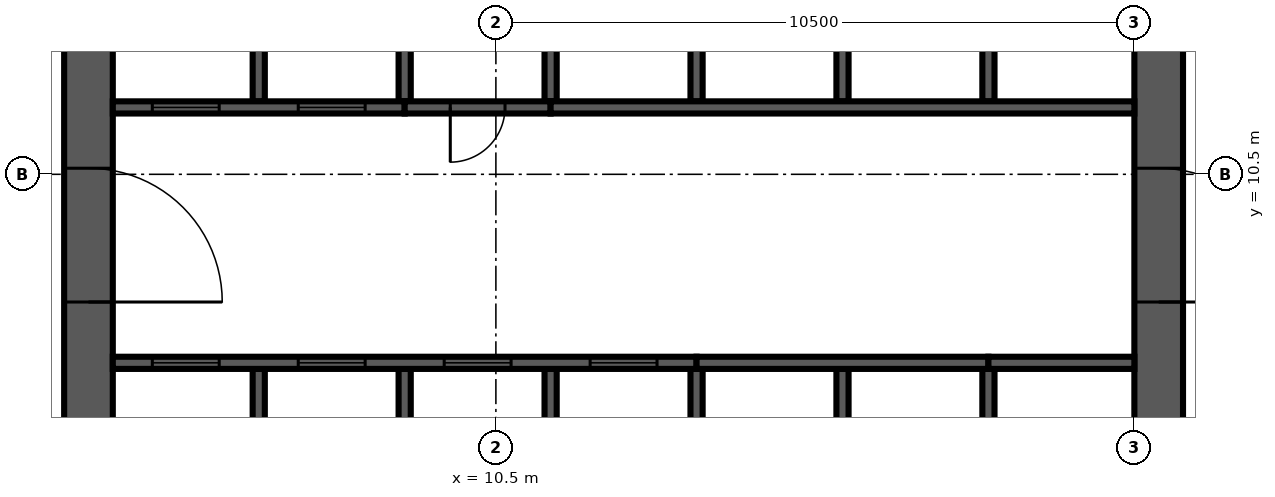
"""IFC4 building model, lengths in metres.
Left out: names, types, materials, properties, quantities, classifications, styles, units other than length and angle.
Written with IfcOpenShell. Run it as: python <this file> out.ifc"""

import sys

from ifc_helpers import new_model, si_unit, direction, frame, frame_2d, origin, place, context, subcontext, project, spatial, rectangle, extrude, source, transform, mapped, element, fill, save


model = new_model("IFC4")
c1 = context("Model", 3, precision=1e-05, world=origin(), true_north=direction((0.0, 1.0)))
c2 = subcontext(c1, "Body", "Model", "MODEL_VIEW")
j1 = project(units=[si_unit("LENGTHUNIT", "METRE"), si_unit("PLANEANGLEUNIT", "RADIAN")], contexts=[c1])
p1 = place(None, origin())
s1 = spatial("IfcSite", under=j1, at=p1, CompositionType="ELEMENT")
p2 = place(p1, origin())
s2 = spatial("IfcBuilding", under=s1, at=p2, CompositionType="ELEMENT")
p3 = place(p2, frame((0.0, 0.0, 177.8)))
s3 = spatial("IfcBuildingStorey", under=s2, at=p3, CompositionType="ELEMENT", Elevation=177.8)
p4 = place(p3, frame((3.8, 4.2, 0.0), z_axis=(0.0, 0.0, 1.0), x_axis=(0.0, 1.0, 0.0)))
e1 = element("IfcWall", 1, at=p4, inside=s3, PredefinedType="SHEAR", context=c2, shape_type="SweptSolid", body=[
    extrude(rectangle(XDim=17.6, YDim=0.8, at=frame_2d((8.8, 0.0))), origin(), (0.0, 0.0, 1.0), 3.8),
])
m1 = source(origin(), c2, "Body", "SweptSolid", [
    extrude(rectangle(XDim=2.2, YDim=2.1, at=frame_2d((1.1, 1.05))), frame((0.0, 0.41, 0.0), z_axis=(0.0, -1.0, 0.0), x_axis=(1.0, 0.0, 0.0)), (0.0, 0.0, 1.0), 0.82),
])
p5 = place(p4, frame((4.2, 0.0, 0.0)))
e2 = element("IfcOpeningElement", 2, at=p5, cuts=e1, PredefinedType="OPENING", context=c2, shape_type="MappedRepresentation", body=[
    mapped(m1, transform((0.0, 0.0, 0.0), scale=1.0)),
])
p6 = place(p4, frame((10.95, 0.0, 0.0)))
e3 = element("IfcOpeningElement", 3, at=p6, cuts=e1, PredefinedType="OPENING", context=c2, shape_type="SweptSolid", body=[
    extrude(rectangle(XDim=0.9, YDim=2.1, at=frame_2d((0.45, 1.05))), frame((0.0, 0.41, 0.0), z_axis=(0.0, -1.0, 0.0), x_axis=(1.0, 0.0, 0.0)), (0.0, 0.0, 1.0), 0.82),
])
p7 = place(p3, frame((21.4, 4.2, 0.0), z_axis=(0.0, 0.0, 1.0), x_axis=(0.0, 1.0, 0.0)))
e4 = element("IfcWall", 4, at=p7, inside=s3, PredefinedType="SHEAR", context=c2, shape_type="SweptSolid", body=[
    extrude(rectangle(XDim=16.8, YDim=0.8, at=frame_2d((8.4, 0.0))), origin(), (0.0, 0.0, 1.0), 3.8),
])
p8 = place(p7, frame((4.2, 0.0, 0.0)))
e5 = element("IfcOpeningElement", 5, at=p8, cuts=e4, PredefinedType="OPENING", context=c2, shape_type="SweptSolid", body=[
    extrude(rectangle(XDim=2.2, YDim=2.1, at=frame_2d((1.1, 1.05))), frame((0.0, 0.41, 0.0), z_axis=(0.0, -1.0, 0.0), x_axis=(1.0, 0.0, 0.0)), (0.0, 0.0, 1.0), 0.82),
])
m2 = source(origin(), c2, "Body", "SweptSolid", [
    extrude(rectangle(XDim=1.2, YDim=2.1, at=frame_2d((0.6, 1.05))), frame((0.0, 0.41, 0.0), z_axis=(0.0, -1.0, 0.0), x_axis=(1.0, 0.0, 0.0)), (0.0, 0.0, 1.0), 0.82),
])
p9 = place(p7, frame((14.7, 0.0, 0.0)))
e6 = element("IfcOpeningElement", 6, at=p9, cuts=e4, PredefinedType="OPENING", context=c2, shape_type="MappedRepresentation", body=[
    mapped(m2, transform((0.0, 0.0, 0.0), scale=1.0)),
])
p10 = place(p3, frame((6.6, 4.2, 0.0), z_axis=(0.0, 0.0, 1.0), x_axis=(0.0, 1.0, 0.0)))
e7 = element("IfcWall", 7, at=p10, inside=s3, PredefinedType="SOLIDWALL", context=c2, shape_type="SweptSolid", body=[
    extrude(rectangle(XDim=3.1, YDim=0.2, at=frame_2d((1.55, 0.0))), origin(), (0.0, 0.0, 1.0), 3.8),
])
m3 = source(origin(), c2, "Body", "SweptSolid", [
    extrude(rectangle(XDim=3.1, YDim=0.2, at=frame_2d((1.55, 0.0))), origin(), (0.0, 0.0, 1.0), 3.8),
])
for number, where, z_axis, x_axis in (
    (8, (9.0, 4.2, 0.0), (0.0, 0.0, 1.0), (0.0, 1.0, 0.0)),
    (9, (11.4, 4.2, 0.0), (0.0, 0.0, 1.0), (0.0, 1.0, 0.0)),
):
    element("IfcWall", number, at=place(p3, frame(where, z_axis=z_axis, x_axis=x_axis)), inside=s3, PredefinedType="SOLIDWALL", context=c2, shape_type="MappedRepresentation", body=[
        mapped(m3, transform((0.0, 0.0, 0.0), scale=1.0)),
    ])
p11 = place(p3, frame((13.8, 4.2, 0.0), z_axis=(0.0, 0.0, 1.0), x_axis=(0.0, 1.0, 0.0)))
e10 = element("IfcWall", 10, at=p11, inside=s3, PredefinedType="SOLIDWALL", context=c2, shape_type="SweptSolid", body=[
    extrude(rectangle(XDim=3.1, YDim=0.2, at=frame_2d((1.55, 0.0))), origin(), (0.0, 0.0, 1.0), 3.4),
])
m4 = source(origin(), c2, "Body", "SweptSolid", [
    extrude(rectangle(XDim=3.1, YDim=0.2, at=frame_2d((1.55, 0.0))), origin(), (0.0, 0.0, 1.0), 3.4),
])
for number, where, z_axis, x_axis in (
    (11, (16.2, 4.2, 0.0), (0.0, 0.0, 1.0), (0.0, 1.0, 0.0)),
    (12, (18.6, 4.2, 0.0), (0.0, 0.0, 1.0), (0.0, 1.0, 0.0)),
):
    element("IfcWall", number, at=place(p3, frame(where, z_axis=z_axis, x_axis=x_axis)), inside=s3, PredefinedType="SOLIDWALL", context=c2, shape_type="MappedRepresentation", body=[
        mapped(m4, transform((0.0, 0.0, 0.0), scale=1.0)),
    ])
p12 = place(p3, frame((6.6, 11.7, 0.0), z_axis=(0.0, 0.0, 1.0), x_axis=(0.0, 1.0, 0.0)))
e13 = element("IfcWall", 13, at=p12, inside=s3, PredefinedType="SOLIDWALL", context=c2, shape_type="SweptSolid", body=[
    extrude(rectangle(XDim=3.0, YDim=0.2, at=frame_2d((1.5, 0.0))), origin(), (0.0, 0.0, 1.0), 3.8),
])
p13 = place(p3, frame((9.0, 11.7, 0.0), z_axis=(0.0, 0.0, 1.0), x_axis=(0.0, 1.0, 0.0)))
e14 = element("IfcWall", 14, at=p13, inside=s3, PredefinedType="SOLIDWALL", context=c2, shape_type="SweptSolid", body=[
    extrude(rectangle(XDim=3.0, YDim=0.2, at=frame_2d((1.5, 0.0))), origin(), (0.0, 0.0, 1.0), 3.4),
])
m5 = source(origin(), c2, "Body", "SweptSolid", [
    extrude(rectangle(XDim=3.0, YDim=0.2, at=frame_2d((1.5, 0.0))), origin(), (0.0, 0.0, 1.0), 3.4),
])
p14 = place(p3, frame((11.4, 11.7, 0.0), z_axis=(0.0, 0.0, 1.0), x_axis=(0.0, 1.0, 0.0)))
e15 = element("IfcWall", 15, at=p14, inside=s3, PredefinedType="SOLIDWALL", context=c2, shape_type="MappedRepresentation", body=[
    mapped(m5, transform((0.0, 0.0, 0.0), scale=1.0)),
])
m6 = source(origin(), c2, "Body", "SweptSolid", [
    extrude(rectangle(XDim=3.0, YDim=0.2, at=frame_2d((1.5, 0.0))), origin(), (0.0, 0.0, 1.0), 3.8),
])
for number, where, z_axis, x_axis in (
    (16, (13.8, 11.7, 0.0), (0.0, 0.0, 1.0), (0.0, 1.0, 0.0)),
    (17, (16.2, 11.7, 0.0), (0.0, 0.0, 1.0), (0.0, 1.0, 0.0)),
    (18, (18.6, 11.7, 0.0), (0.0, 0.0, 1.0), (0.0, 1.0, 0.0)),
):
    element("IfcWall", number, at=place(p3, frame(where, z_axis=z_axis, x_axis=x_axis)), inside=s3, PredefinedType="SOLIDWALL", context=c2, shape_type="MappedRepresentation", body=[
        mapped(m6, transform((0.0, 0.0, 0.0), scale=1.0)),
    ])
p15 = place(p3, frame((4.2, 7.4, 0.0), z_axis=(0.0, 0.0, 1.0), x_axis=(1.0, 0.0, 0.0)))
e19 = element("IfcWall", 19, at=p15, inside=s3, PredefinedType="SOLIDWALL", context=c2, shape_type="SweptSolid", body=[
    extrude(rectangle(XDim=9.6, YDim=0.2, at=frame_2d((4.8, 0.0))), origin(), (0.0, 0.0, 1.0), 3.8),
])
m7 = source(origin(), c2, "Body", "SweptSolid", [
    extrude(rectangle(XDim=1.1, YDim=2.1, at=frame_2d((0.55, 1.05))), frame((0.0, 0.11, 0.0), z_axis=(0.0, -1.0, 0.0), x_axis=(1.0, 0.0, 0.0)), (0.0, 0.0, 1.0), 0.22),
])
p16 = place(p15, frame((0.65, 0.0, 0.0)))
e20 = element("IfcOpeningElement", 20, at=p16, cuts=e19, PredefinedType="OPENING", context=c2, shape_type="MappedRepresentation", body=[
    mapped(m7, transform((0.0, 0.0, 0.0), scale=1.0)),
])
p17 = place(p15, frame((3.05, 0.0, 0.0)))
e21 = element("IfcOpeningElement", 21, at=p17, cuts=e19, PredefinedType="OPENING", context=c2, shape_type="MappedRepresentation", body=[
    mapped(m7, transform((0.0, 0.0, 0.0), scale=1.0)),
])
p18 = place(p15, frame((5.45, 0.0, 0.0)))
e22 = element("IfcOpeningElement", 22, at=p18, cuts=e19, PredefinedType="OPENING", context=c2, shape_type="MappedRepresentation", body=[
    mapped(m7, transform((0.0, 0.0, 0.0), scale=1.0)),
])
p19 = place(p15, frame((7.85, 0.0, 0.0)))
e23 = element("IfcOpeningElement", 23, at=p19, cuts=e19, PredefinedType="OPENING", context=c2, shape_type="MappedRepresentation", body=[
    mapped(m7, transform((0.0, 0.0, 0.0), scale=1.0)),
])
p20 = place(p3, frame((13.8, 7.4, 0.0), z_axis=(0.0, 0.0, 1.0), x_axis=(1.0, 0.0, 0.0)))
e24 = element("IfcWall", 24, at=p20, inside=s3, PredefinedType="SOLIDWALL", context=c2, shape_type="SweptSolid", body=[
    extrude(rectangle(XDim=4.8, YDim=0.2, at=frame_2d((2.4, 0.0))), origin(), (0.0, 0.0, 1.0), 3.4),
])
p21 = place(p3, frame((18.6, 7.4, 0.0), z_axis=(0.0, 0.0, 1.0), x_axis=(1.0, 0.0, 0.0)))
e25 = element("IfcWall", 25, at=p21, inside=s3, PredefinedType="SOLIDWALL", context=c2, shape_type="SweptSolid", body=[
    extrude(rectangle(XDim=2.4, YDim=0.2, at=frame_2d((1.2, 0.0))), origin(), (0.0, 0.0, 1.0), 3.8),
])
p22 = place(p3, frame((4.2, 11.6, 0.0), z_axis=(0.0, 0.0, 1.0), x_axis=(1.0, 0.0, 0.0)))
e26 = element("IfcWall", 26, at=p22, inside=s3, PredefinedType="SOLIDWALL", context=c2, shape_type="SweptSolid", body=[
    extrude(rectangle(XDim=4.8, YDim=0.2, at=frame_2d((2.4, 0.0))), origin(), (0.0, 0.0, 1.0), 3.8),
])
p23 = place(p22, frame((0.65, 0.0, 0.0)))
e27 = element("IfcOpeningElement", 27, at=p23, cuts=e26, PredefinedType="OPENING", context=c2, shape_type="MappedRepresentation", body=[
    mapped(m7, transform((0.0, 0.0, 0.0), scale=1.0)),
])
p24 = place(p22, frame((3.05, 0.0, 0.0)))
e28 = element("IfcOpeningElement", 28, at=p24, cuts=e26, PredefinedType="OPENING", context=c2, shape_type="MappedRepresentation", body=[
    mapped(m7, transform((0.0, 0.0, 0.0), scale=1.0)),
])
p25 = place(p3, frame((9.0, 11.6, 0.0), z_axis=(0.0, 0.0, 1.0), x_axis=(1.0, 0.0, 0.0)))
e29 = element("IfcWall", 29, at=p25, inside=s3, PredefinedType="SOLIDWALL", context=c2, shape_type="SweptSolid", body=[
    extrude(rectangle(XDim=2.4, YDim=0.2, at=frame_2d((1.2, 0.0))), origin(), (0.0, 0.0, 1.0), 3.4),
])
m8 = source(origin(), c2, "Body", "SweptSolid", [
    extrude(rectangle(XDim=0.9, YDim=2.1, at=frame_2d((0.45, 1.05))), frame((0.0, 0.11, 0.0), z_axis=(0.0, -1.0, 0.0), x_axis=(1.0, 0.0, 0.0)), (0.0, 0.0, 1.0), 0.22),
])
p26 = place(p25, frame((0.75, 0.0, 0.0)))
e30 = element("IfcOpeningElement", 30, at=p26, cuts=e29, PredefinedType="OPENING", context=c2, shape_type="MappedRepresentation", body=[
    mapped(m8, transform((0.0, 0.0, 0.0), scale=1.0)),
])
m9 = source(origin(), c2, "Body", "SweptSolid", [
    extrude(rectangle(XDim=9.6, YDim=0.2, at=frame_2d((4.8, 0.0))), origin(), (0.0, 0.0, 1.0), 3.8),
])
p27 = place(p3, frame((11.4, 11.6, 0.0), z_axis=(0.0, 0.0, 1.0), x_axis=(1.0, 0.0, 0.0)))
e31 = element("IfcWall", 31, at=p27, inside=s3, PredefinedType="SOLIDWALL", context=c2, shape_type="MappedRepresentation", body=[
    mapped(m9, transform((0.0, 0.0, 0.0), scale=1.0)),
])
m10 = source(origin(), c2, "Body", "SweptSolid", [
    extrude(rectangle(XDim=1.1, YDim=2.1, at=frame_2d((0.55, 1.05))), frame((0.0, 0.025, 0.0), z_axis=(0.0, -1.0, 0.0), x_axis=(1.0, 0.0, 0.0)), (0.0, 0.0, 1.0), 0.05),
])
p28 = place(p16, origin())
e32 = element("IfcDoor", 32, at=p28, inside=s3, OperationType="SLIDING_TO_LEFT", PredefinedType="DOOR", context=c2, shape_type="MappedRepresentation", body=[
    mapped(m10, transform((0.0, 0.0, 0.0), scale=1.0)),
])
fill(e20, e32)
p29 = place(p17, origin())
e33 = element("IfcDoor", 33, at=p29, inside=s3, OperationType="SLIDING_TO_LEFT", PredefinedType="DOOR", context=c2, shape_type="MappedRepresentation", body=[
    mapped(m10, transform((0.0, 0.0, 0.0), scale=1.0)),
])
fill(e21, e33)
p30 = place(p18, origin())
e34 = element("IfcDoor", 34, at=p30, inside=s3, OperationType="SLIDING_TO_LEFT", PredefinedType="DOOR", context=c2, shape_type="MappedRepresentation", body=[
    mapped(m10, transform((0.0, 0.0, 0.0), scale=1.0)),
])
fill(e22, e34)
p31 = place(p19, origin())
e35 = element("IfcDoor", 35, at=p31, inside=s3, OperationType="SLIDING_TO_LEFT", PredefinedType="DOOR", context=c2, shape_type="MappedRepresentation", body=[
    mapped(m10, transform((0.0, 0.0, 0.0), scale=1.0)),
])
fill(e23, e35)
p32 = place(p23, origin())
e36 = element("IfcDoor", 36, at=p32, inside=s3, OperationType="SLIDING_TO_LEFT", PredefinedType="DOOR", context=c2, shape_type="MappedRepresentation", body=[
    mapped(m10, transform((0.0, 0.0, 0.0), scale=1.0)),
])
fill(e27, e36)
p33 = place(p24, origin())
e37 = element("IfcDoor", 37, at=p33, inside=s3, OperationType="SLIDING_TO_LEFT", PredefinedType="DOOR", context=c2, shape_type="MappedRepresentation", body=[
    mapped(m10, transform((0.0, 0.0, 0.0), scale=1.0)),
])
fill(e28, e37)
m11 = source(origin(), c2, "Body", "SweptSolid", [
    extrude(rectangle(XDim=0.9, YDim=2.1, at=frame_2d((0.45, 1.05))), frame((0.0, 0.025, 0.0), z_axis=(0.0, -1.0, 0.0), x_axis=(1.0, 0.0, 0.0)), (0.0, 0.0, 1.0), 0.05),
])
p34 = place(p26, origin())
e38 = element("IfcDoor", 38, at=p34, inside=s3, OperationType="SINGLE_SWING_RIGHT", PredefinedType="DOOR", context=c2, shape_type="MappedRepresentation", body=[
    mapped(m11, transform((0.0, 0.0, 0.0), scale=1.0)),
])
fill(e30, e38)
m12 = source(origin(), c2, "Body", "SweptSolid", [
    extrude(rectangle(XDim=2.2, YDim=2.1, at=frame_2d((1.1, 1.05))), frame((0.0, 0.025, 0.0), z_axis=(0.0, -1.0, 0.0), x_axis=(1.0, 0.0, 0.0)), (0.0, 0.0, 1.0), 0.05),
])
p35 = place(p8, origin())
e39 = element("IfcDoor", 39, at=p35, inside=s3, OperationType="DOUBLE_DOOR_SINGLE_SWING", PredefinedType="DOOR", context=c2, shape_type="MappedRepresentation", body=[
    mapped(m12, transform((0.0, 0.0, 0.0), scale=1.0)),
])
fill(e5, e39)
p36 = place(p5, origin())
e40 = element("IfcDoor", 40, at=p36, inside=s3, OperationType="DOUBLE_DOOR_SINGLE_SWING", PredefinedType="DOOR", context=c2, shape_type="MappedRepresentation", body=[
    mapped(m12, transform((0.0, 0.0, 0.0), scale=1.0)),
])
fill(e2, e40)
save(model, sys.argv[1])
